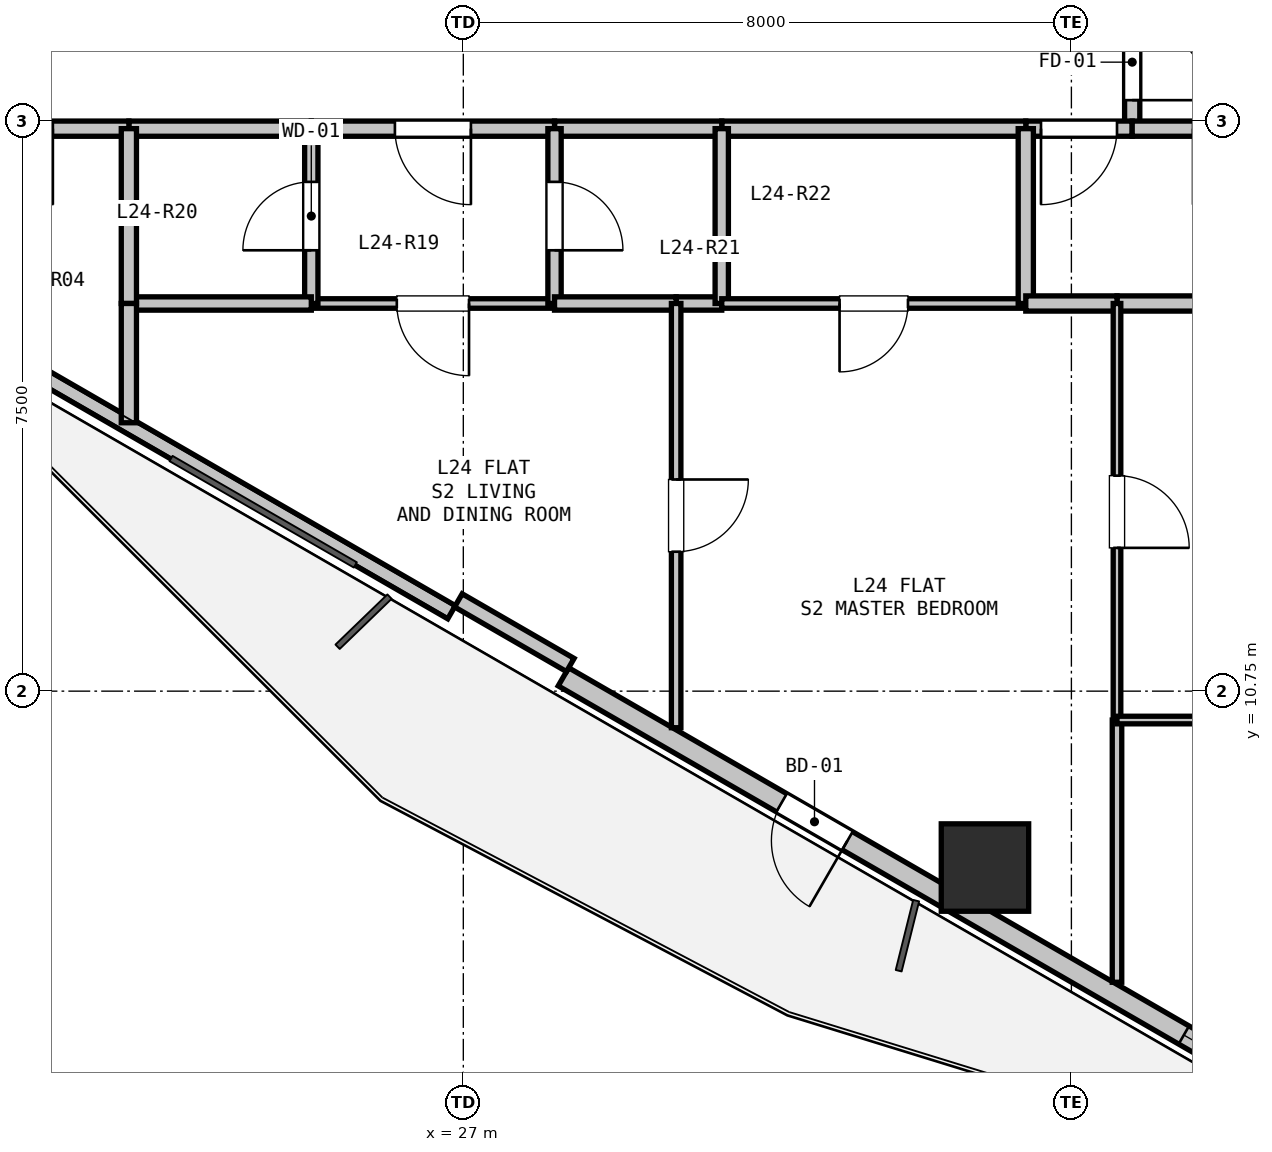
"""IFC4 building model, lengths in metres.
Left out: names, types, materials, properties, quantities, classifications, styles, units other than length and angle.
Written with IfcOpenShell. Run it as: python <this file> out.ifc"""

import sys

from ifc_helpers import new_model, si_unit, direction, frame, frame_2d, origin, origin_2d, place, context, subcontext, project, spatial, rectangle, hollow_rectangle, extrude, element, fill, save


model = new_model("IFC4")
c1 = context("Model", 3, precision=1e-05, world=origin(), true_north=direction((0.0, 1.0)))
c2 = subcontext(c1, "Body", "Model", "MODEL_VIEW")
j1 = project(units=[si_unit("LENGTHUNIT", "METRE"), si_unit("PLANEANGLEUNIT", "RADIAN")], contexts=[c1])
p1 = place(None, origin())
s1 = spatial("IfcSite", under=j1, at=p1, CompositionType="ELEMENT")
p2 = place(p1, origin())
s2 = spatial("IfcBuilding", under=s1, at=p2, CompositionType="ELEMENT")
p3 = place(p2, frame((0.0, 0.0, 90.0)))
s3 = spatial("IfcBuildingStorey", under=s2, at=p3, CompositionType="ELEMENT", Elevation=90.0)
p4 = place(p3, frame((33.863, 8.429, 0.0), z_axis=(0.0, 0.0, 1.0), x_axis=(1.0, 0.0, 0.0)))
e1 = element("IfcColumn", 1, at=p4, inside=s3, PredefinedType="COLUMN", context=c2, shape_type="SweptSolid", body=[
    extrude(hollow_rectangle(XDim=1.15, YDim=1.15, WallThickness=0.032, at=origin_2d()), origin(), (0.0, 0.0, 1.0), 3.3),
])
p5 = place(p3, frame((38.649, 4.973, 0.0), z_axis=(0.0, 0.0, 1.0), x_axis=(-0.866023023012, 0.500004123596, 0.0)))
e2 = element("IfcWall", 2, at=p5, inside=s3, PredefinedType="SOLIDWALL", context=c2, shape_type="SweptSolid", body=[
    extrude(rectangle(XDim=11.93, YDim=0.275, at=frame_2d((5.965, 0.0))), origin(), (0.0, 0.0, 1.0), 2.67),
])
p6 = place(p5, frame((7.616, 0.0, 0.0)))
e3 = element("IfcOpeningElement", 3, at=p6, cuts=e2, PredefinedType="OPENING", context=c2, shape_type="SweptSolid", body=[
    extrude(rectangle(XDim=1.0, YDim=2.1, at=frame_2d((0.5, 1.05))), frame((0.0, 0.147, 0.0), z_axis=(0.0, -1.0, 0.0), x_axis=(1.0, 0.0, 0.0)), (0.0, 0.0, 1.0), 0.295),
])
p7 = place(p5, frame((1.305, 0.0, 0.9)))
e4 = element("IfcOpeningElement", 4, at=p7, cuts=e2, PredefinedType="OPENING", context=c2, shape_type="SweptSolid", body=[
    extrude(rectangle(XDim=1.2, YDim=1.4, at=frame_2d((0.6, 0.7))), frame((0.0, 0.147, 0.0), z_axis=(0.0, -1.0, 0.0), x_axis=(1.0, 0.0, 0.0)), (0.0, 0.0, 1.0), 0.295),
])
p8 = place(p3, frame((26.845, 11.788, 0.0), z_axis=(0.0, 0.0, 1.0), x_axis=(-0.866027010039, 0.499997217876, 0.0)))
e5 = element("IfcWall", 5, at=p8, inside=s3, PredefinedType="PARAPET", context=c2, shape_type="SweptSolid", body=[
    extrude(rectangle(XDim=11.229, YDim=0.2, at=frame_2d((5.615, 0.0))), origin(), (0.0, 0.0, 1.0), 0.2),
])
p9 = place(p3, frame((28.407, 11.094, 0.0), z_axis=(0.0, 0.0, 1.0), x_axis=(-0.86605165483, 0.499954529098, 0.0)))
e6 = element("IfcWall", 6, at=p9, inside=s3, PredefinedType="PARAPET", context=c2, shape_type="SweptSolid", body=[
    extrude(rectangle(XDim=1.7, YDim=0.2, at=frame_2d((0.85, 0.0))), origin(), (0.0, 0.0, 1.0), 2.67),
])
p10 = place(p3, frame((35.8, 19.9, 0.0), z_axis=(0.0, 0.0, 1.0), x_axis=(0.0, -1.0, 0.0)))
e7 = element("IfcWall", 7, at=p10, inside=s3, PredefinedType="PARTITIONING", context=c2, shape_type="SweptSolid", body=[
    extrude(rectangle(XDim=1.75, YDim=0.2, at=frame_2d((0.875, 0.0))), origin(), (0.0, 0.0, 1.0), 3.05),
])
p11 = place(p10, frame((0.375, 0.0, 0.0)))
e8 = element("IfcOpeningElement", 8, at=p11, cuts=e7, PredefinedType="OPENING", context=c2, shape_type="SweptSolid", body=[
    extrude(rectangle(XDim=1.0, YDim=2.15, at=frame_2d((0.5, 1.075))), frame((0.0, 0.11, 0.0), z_axis=(0.0, -1.0, 0.0), x_axis=(1.0, 0.0, 0.0)), (0.0, 0.0, 1.0), 0.22),
])
p12 = place(p3, frame((35.8, 18.15, 0.0), z_axis=(0.0, 0.0, 1.0), x_axis=(-1.0, 0.0, 0.0)))
e9 = element("IfcWall", 9, at=p12, inside=s3, PredefinedType="PARTITIONING", context=c2, shape_type="SweptSolid", body=[
    extrude(rectangle(XDim=1.4, YDim=0.2, at=frame_2d((0.7, 0.0))), origin(), (0.0, 0.0, 1.0), 3.05),
])
p13 = place(p12, frame((0.2, 0.0, 0.0)))
e10 = element("IfcOpeningElement", 10, at=p13, cuts=e9, PredefinedType="OPENING", context=c2, shape_type="SweptSolid", body=[
    extrude(rectangle(XDim=1.0, YDim=2.15, at=frame_2d((0.5, 1.075))), frame((0.0, 0.11, 0.0), z_axis=(0.0, -1.0, 0.0), x_axis=(1.0, 0.0, 0.0)), (0.0, 0.0, 1.0), 0.22),
])
p14 = place(p3, frame((34.4, 18.15, 0.0), z_axis=(0.0, 0.0, 1.0), x_axis=(-1.0, 0.0, 0.0)))
e11 = element("IfcWall", 11, at=p14, inside=s3, PredefinedType="PARTITIONING", context=c2, shape_type="SweptSolid", body=[
    extrude(rectangle(XDim=4.0, YDim=0.2, at=frame_2d((2.0, 0.0))), origin(), (0.0, 0.0, 1.0), 3.05),
])
p15 = place(p3, frame((30.4, 18.15, 0.0), z_axis=(0.0, 0.0, 1.0), x_axis=(-1.0, 0.0, 0.0)))
e12 = element("IfcWall", 12, at=p15, inside=s3, PredefinedType="PARTITIONING", context=c2, shape_type="SweptSolid", body=[
    extrude(rectangle(XDim=2.2, YDim=0.2, at=frame_2d((1.1, 0.0))), origin(), (0.0, 0.0, 1.0), 3.05),
])
p16 = place(p3, frame((28.2, 18.15, 0.0), z_axis=(0.0, 0.0, 1.0), x_axis=(-1.0, 0.0, 0.0)))
e13 = element("IfcWall", 13, at=p16, inside=s3, PredefinedType="PARTITIONING", context=c2, shape_type="SweptSolid", body=[
    extrude(rectangle(XDim=3.2, YDim=0.2, at=frame_2d((1.6, 0.0))), origin(), (0.0, 0.0, 1.0), 3.05),
])
p17 = place(p16, frame((1.1, 0.0, 0.0)))
e14 = element("IfcOpeningElement", 14, at=p17, cuts=e13, PredefinedType="OPENING", context=c2, shape_type="SweptSolid", body=[
    extrude(rectangle(XDim=1.0, YDim=2.15, at=frame_2d((0.5, 1.075))), frame((0.0, 0.11, 0.0), z_axis=(0.0, -1.0, 0.0), x_axis=(1.0, 0.0, 0.0)), (0.0, 0.0, 1.0), 0.22),
])
p18 = place(p3, frame((25.0, 18.15, 0.0), z_axis=(0.0, 0.0, 1.0), x_axis=(-1.0, 0.0, 0.0)))
e15 = element("IfcWall", 15, at=p18, inside=s3, PredefinedType="PARTITIONING", context=c2, shape_type="SweptSolid", body=[
    extrude(rectangle(XDim=2.4, YDim=0.2, at=frame_2d((1.2, 0.0))), origin(), (0.0, 0.0, 1.0), 2.423),
])
p19 = place(p3, frame((22.6, 18.15, 0.0), z_axis=(0.0, 0.0, 1.0), x_axis=(-1.0, 0.0, 0.0)))
e16 = element("IfcWall", 16, at=p19, inside=s3, PredefinedType="PARTITIONING", context=c2, shape_type="SweptSolid", body=[
    extrude(rectangle(XDim=3.0, YDim=0.2, at=frame_2d((1.5, 0.0))), origin(), (0.0, 0.0, 1.0), 3.05),
])
p20 = place(p19, frame((1.0, 0.0, 0.0)))
e17 = element("IfcOpeningElement", 17, at=p20, cuts=e16, PredefinedType="OPENING", context=c2, shape_type="SweptSolid", body=[
    extrude(rectangle(XDim=1.0, YDim=2.15, at=frame_2d((0.5, 1.075))), frame((0.0, 0.11, 0.0), z_axis=(0.0, -1.0, 0.0), x_axis=(1.0, 0.0, 0.0)), (0.0, 0.0, 1.0), 0.22),
])
p21 = place(p3, frame((38.4, 18.15, 0.0), z_axis=(0.0, 0.0, 1.0), x_axis=(-1.0, 0.0, 0.0)))
e18 = element("IfcWall", 18, at=p21, inside=s3, PredefinedType="PARTITIONING", context=c2, shape_type="SweptSolid", body=[
    extrude(rectangle(XDim=2.6, YDim=0.2, at=frame_2d((1.3, 0.0))), origin(), (0.0, 0.0, 1.0), 2.423),
])
p22 = place(p21, frame((0.8, 0.0, 0.0)))
e19 = element("IfcOpeningElement", 19, at=p22, cuts=e18, PredefinedType="OPENING", context=c2, shape_type="SweptSolid", body=[
    extrude(rectangle(XDim=1.0, YDim=2.15, at=frame_2d((0.5, 1.075))), frame((0.0, 0.11, 0.0), z_axis=(0.0, -1.0, 0.0), x_axis=(1.0, 0.0, 0.0)), (0.0, 0.0, 1.0), 0.22),
])
p23 = place(p3, frame((28.2, 15.85, 0.0), z_axis=(0.0, 0.0, 1.0), x_axis=(-1.0, 0.0, 0.0)))
e20 = element("IfcWall", 20, at=p23, inside=s3, PredefinedType="PARTITIONING", context=c2, shape_type="SweptSolid", body=[
    extrude(rectangle(XDim=3.2, YDim=0.125, at=frame_2d((1.6, 0.0))), origin(), (0.0, 0.0, 1.0), 2.423),
])
p24 = place(p23, frame((1.125, 0.0, 0.0)))
e21 = element("IfcOpeningElement", 21, at=p24, cuts=e20, PredefinedType="OPENING", context=c2, shape_type="SweptSolid", body=[
    extrude(rectangle(XDim=0.95, YDim=2.1, at=frame_2d((0.475, 1.05))), frame((0.0, 0.073, 0.0), z_axis=(0.0, -1.0, 0.0), x_axis=(1.0, 0.0, 0.0)), (0.0, 0.0, 1.0), 0.145),
])
p25 = place(p3, frame((25.0, 15.85, 0.0), z_axis=(0.0, 0.0, 1.0), x_axis=(0.0, 1.0, 0.0)))
e22 = element("IfcWall", 22, at=p25, inside=s3, PredefinedType="PLUMBINGWALL", context=c2, shape_type="SweptSolid", body=[
    extrude(rectangle(XDim=2.3, YDim=0.175, at=frame_2d((1.15, 0.0))), origin(), (0.0, 0.0, 1.0), 2.423),
])
p26 = place(p25, frame((0.7, 0.0, 0.0)))
e23 = element("IfcOpeningElement", 23, at=p26, cuts=e22, PredefinedType="OPENING", context=c2, shape_type="SweptSolid", body=[
    extrude(rectangle(XDim=0.9, YDim=2.1, at=frame_2d((0.45, 1.05))), frame((0.0, 0.097, 0.0), z_axis=(0.0, -1.0, 0.0), x_axis=(1.0, 0.0, 0.0)), (0.0, 0.0, 1.0), 0.195),
])
p27 = place(p3, frame((28.2, 18.15, 0.0), z_axis=(0.0, 0.0, 1.0), x_axis=(0.0, -1.0, 0.0)))
e24 = element("IfcWall", 24, at=p27, inside=s3, PredefinedType="PLUMBINGWALL", context=c2, shape_type="SweptSolid", body=[
    extrude(rectangle(XDim=2.3, YDim=0.175, at=frame_2d((1.15, 0.0))), origin(), (0.0, 0.0, 1.0), 3.05),
])
p28 = place(p27, frame((0.7, 0.0, 0.0)))
e25 = element("IfcOpeningElement", 25, at=p28, cuts=e24, PredefinedType="OPENING", context=c2, shape_type="SweptSolid", body=[
    extrude(rectangle(XDim=0.9, YDim=2.1, at=frame_2d((0.45, 1.05))), frame((0.0, 0.097, 0.0), z_axis=(0.0, -1.0, 0.0), x_axis=(1.0, 0.0, 0.0)), (0.0, 0.0, 1.0), 0.195),
])
p29 = place(p3, frame((25.0, 15.85, 0.0), z_axis=(0.0, 0.0, 1.0), x_axis=(-1.0, 0.0, 0.0)))
e26 = element("IfcWall", 26, at=p29, inside=s3, PredefinedType="PLUMBINGWALL", context=c2, shape_type="SweptSolid", body=[
    extrude(rectangle(XDim=2.4, YDim=0.175, at=frame_2d((1.2, 0.0))), origin(), (0.0, 0.0, 1.0), 3.05),
])
p30 = place(p3, frame((22.6, 15.85, 0.0), z_axis=(0.0, 0.0, 1.0), x_axis=(0.0, 1.0, 0.0)))
e27 = element("IfcWall", 27, at=p30, inside=s3, PredefinedType="PARTITIONING", context=c2, shape_type="SweptSolid", body=[
    extrude(rectangle(XDim=2.3, YDim=0.2, at=frame_2d((1.15, 0.0))), origin(), (0.0, 0.0, 1.0), 3.05),
])
p31 = place(p3, frame((30.4, 15.85, 0.0), z_axis=(0.0, 0.0, 1.0), x_axis=(-1.0, 0.0, 0.0)))
e28 = element("IfcWall", 28, at=p31, inside=s3, PredefinedType="PLUMBINGWALL", context=c2, shape_type="SweptSolid", body=[
    extrude(rectangle(XDim=0.6, YDim=0.175, at=frame_2d((0.3, 0.0))), origin(), (0.0, 0.0, 1.0), 3.05),
])
p32 = place(p3, frame((29.8, 15.85, 0.0), z_axis=(0.0, 0.0, 1.0), x_axis=(-1.0, 0.0, 0.0)))
e29 = element("IfcWall", 29, at=p32, inside=s3, PredefinedType="PLUMBINGWALL", context=c2, shape_type="SweptSolid", body=[
    extrude(rectangle(XDim=1.6, YDim=0.175, at=frame_2d((0.8, 0.0))), origin(), (0.0, 0.0, 1.0), 3.05),
])
p33 = place(p3, frame((30.4, 18.15, 0.0), z_axis=(0.0, 0.0, 1.0), x_axis=(0.0, -1.0, 0.0)))
e30 = element("IfcWall", 30, at=p33, inside=s3, PredefinedType="PLUMBINGWALL", context=c2, shape_type="SweptSolid", body=[
    extrude(rectangle(XDim=2.3, YDim=0.175, at=frame_2d((1.15, 0.0))), origin(), (0.0, 0.0, 1.0), 3.05),
])
p34 = place(p3, frame((34.4, 15.85, 0.0), z_axis=(0.0, 0.0, 1.0), x_axis=(-1.0, 0.0, 0.0)))
e31 = element("IfcWall", 31, at=p34, inside=s3, PredefinedType="PARTITIONING", context=c2, shape_type="SweptSolid", body=[
    extrude(rectangle(XDim=4.0, YDim=0.125, at=frame_2d((2.0, 0.0))), origin(), (0.0, 0.0, 1.0), 3.05),
])
p35 = place(p34, frame((1.55, 0.0, 0.0)))
e32 = element("IfcOpeningElement", 32, at=p35, cuts=e31, PredefinedType="OPENING", context=c2, shape_type="SweptSolid", body=[
    extrude(rectangle(XDim=0.9, YDim=2.1, at=frame_2d((0.45, 1.05))), frame((0.0, 0.073, 0.0), z_axis=(0.0, -1.0, 0.0), x_axis=(1.0, 0.0, 0.0)), (0.0, 0.0, 1.0), 0.145),
])
p36 = place(p3, frame((34.4, 18.15, 0.0), z_axis=(0.0, 0.0, 1.0), x_axis=(0.0, -1.0, 0.0)))
e33 = element("IfcWall", 33, at=p36, inside=s3, PredefinedType="PARTITIONING", context=c2, shape_type="SweptSolid", body=[
    extrude(rectangle(XDim=2.3, YDim=0.2, at=frame_2d((1.15, 0.0))), origin(), (0.0, 0.0, 1.0), 3.05),
])
p37 = place(p3, frame((42.873, 15.85, 0.0), z_axis=(0.0, 0.0, 1.0), x_axis=(-1.0, 0.0, 0.0)))
e34 = element("IfcWall", 34, at=p37, inside=s3, PredefinedType="PARTITIONING", context=c2, shape_type="SweptSolid", body=[
    extrude(rectangle(XDim=7.273, YDim=0.2, at=frame_2d((3.636, 0.0))), origin(), (0.0, 0.0, 1.0), 2.365),
])
p38 = place(p3, frame((35.6, 15.85, 0.0), z_axis=(0.0, 0.0, 1.0), x_axis=(-1.0, 0.0, 0.0)))
e35 = element("IfcWall", 35, at=p38, inside=s3, PredefinedType="PARTITIONING", context=c2, shape_type="SweptSolid", body=[
    extrude(rectangle(XDim=1.2, YDim=0.2, at=frame_2d((0.6, 0.0))), origin(), (0.0, 0.0, 1.0), 3.05),
])
p39 = place(p3, frame((22.6, 15.85, 0.0), z_axis=(0.0, 0.0, 1.0), x_axis=(0.0, -1.0, 0.0)))
e36 = element("IfcWall", 36, at=p39, inside=s3, PredefinedType="PARTITIONING", context=c2, shape_type="SweptSolid", body=[
    extrude(rectangle(XDim=1.569, YDim=0.2, at=frame_2d((0.785, 0.0))), origin(), (0.0, 0.0, 1.0), 2.365),
])
p40 = place(p3, frame((29.8, 15.85, 0.0), z_axis=(0.0, 0.0, 1.0), x_axis=(0.0, -1.0, 0.0)))
e37 = element("IfcWall", 37, at=p40, inside=s3, PredefinedType="PARTITIONING", context=c2, shape_type="SweptSolid", body=[
    extrude(rectangle(XDim=5.581, YDim=0.125, at=frame_2d((2.791, 0.0))), origin(), (0.0, 0.0, 1.0), 2.365),
])
p41 = place(p40, frame((2.315, 0.0, 0.0)))
e38 = element("IfcOpeningElement", 38, at=p41, cuts=e37, PredefinedType="OPENING", context=c2, shape_type="SweptSolid", body=[
    extrude(rectangle(XDim=0.95, YDim=2.1, at=frame_2d((0.475, 1.05))), frame((0.0, 0.073, 0.0), z_axis=(0.0, -1.0, 0.0), x_axis=(1.0, 0.0, 0.0)), (0.0, 0.0, 1.0), 0.145),
])
p42 = place(p3, frame((35.6, 15.85, 0.0), z_axis=(0.0, 0.0, 1.0), x_axis=(0.0, -1.0, 0.0)))
e39 = element("IfcWall", 39, at=p42, inside=s3, PredefinedType="PARTITIONING", context=c2, shape_type="SweptSolid", body=[
    extrude(rectangle(XDim=5.48, YDim=0.1, at=frame_2d((2.74, 0.0))), origin(), (0.0, 0.0, 1.0), 3.05),
])
p43 = place(p42, frame((2.265, 0.0, 0.0)))
e40 = element("IfcOpeningElement", 40, at=p43, cuts=e39, PredefinedType="OPENING", context=c2, shape_type="SweptSolid", body=[
    extrude(rectangle(XDim=0.95, YDim=2.1, at=frame_2d((0.475, 1.05))), frame((0.0, 0.06, 0.0), z_axis=(0.0, -1.0, 0.0), x_axis=(1.0, 0.0, 0.0)), (0.0, 0.0, 1.0), 0.12),
])
p44 = place(p3, frame((35.6, 10.37, 0.0), z_axis=(0.0, 0.0, 1.0), x_axis=(0.0, -1.0, 0.0)))
e41 = element("IfcWall", 41, at=p44, inside=s3, PredefinedType="PARTITIONING", context=c2, shape_type="SweptSolid", body=[
    extrude(rectangle(XDim=3.45, YDim=0.125, at=frame_2d((1.725, 0.0))), origin(), (0.0, 0.0, 1.0), 2.66),
])
p45 = place(p3, frame((35.6, 10.37, 0.0), z_axis=(0.0, 0.0, 1.0), x_axis=(1.0, 0.0, 0.0)))
e42 = element("IfcWall", 42, at=p45, inside=s3, PredefinedType="PARTITIONING", context=c2, shape_type="SweptSolid", body=[
    extrude(rectangle(XDim=7.273, YDim=0.1, at=frame_2d((3.636, 0.0))), origin(), (0.0, 0.0, 1.0), 2.423),
])
p46 = place(p45, frame((3.162, 0.0, 0.0)))
e43 = element("IfcOpeningElement", 43, at=p46, cuts=e42, PredefinedType="OPENING", context=c2, shape_type="SweptSolid", body=[
    extrude(rectangle(XDim=0.95, YDim=2.1, at=frame_2d((0.475, 1.05))), frame((0.0, 0.06, 0.0), z_axis=(0.0, -1.0, 0.0), x_axis=(1.0, 0.0, 0.0)), (0.0, 0.0, 1.0), 0.12),
])
p47 = place(p6, origin())
e44 = element("IfcDoor", 44, at=p47, inside=s3, OperationType="SINGLE_SWING_LEFT", PredefinedType="DOOR", context=c2, shape_type="SweptSolid", body=[
    extrude(rectangle(XDim=1.0, YDim=2.1, at=frame_2d((0.5, 1.05))), frame((0.0, 0.025, 0.0), z_axis=(0.0, -1.0, 0.0), x_axis=(1.0, 0.0, 0.0)), (0.0, 0.0, 1.0), 0.05),
])
fill(e3, e44)
p48 = place(p7, origin())
e45 = element("IfcWindow", 45, at=p48, inside=s3, PartitioningType="SINGLE_PANEL", PredefinedType="WINDOW", context=c2, shape_type="SweptSolid", body=[
    extrude(rectangle(XDim=1.2, YDim=1.4, at=frame_2d((0.6, 0.7))), frame((0.0, 0.03, 0.0), z_axis=(0.0, -1.0, 0.0), x_axis=(1.0, 0.0, 0.0)), (0.0, 0.0, 1.0), 0.06),
])
fill(e4, e45)
p49 = place(p11, origin())
e46 = element("IfcDoor", 46, at=p49, inside=s3, OperationType="SINGLE_SWING_RIGHT", PredefinedType="DOOR", context=c2, shape_type="SweptSolid", body=[
    extrude(rectangle(XDim=1.0, YDim=2.15, at=frame_2d((0.5, 1.075))), frame((0.0, 0.025, 0.0), z_axis=(0.0, -1.0, 0.0), x_axis=(1.0, 0.0, 0.0)), (0.0, 0.0, 1.0), 0.05),
])
fill(e8, e46)
p50 = place(p17, origin())
e47 = element("IfcDoor", 47, at=p50, inside=s3, OperationType="SINGLE_SWING_LEFT", PredefinedType="DOOR", context=c2, shape_type="SweptSolid", body=[
    extrude(rectangle(XDim=1.0, YDim=2.15, at=frame_2d((0.5, 1.075))), frame((0.0, 0.025, 0.0), z_axis=(0.0, -1.0, 0.0), x_axis=(1.0, 0.0, 0.0)), (0.0, 0.0, 1.0), 0.05),
])
fill(e14, e47)
p51 = place(p13, origin())
e48 = element("IfcDoor", 48, at=p51, inside=s3, OperationType="SINGLE_SWING_RIGHT", PredefinedType="DOOR", context=c2, shape_type="SweptSolid", body=[
    extrude(rectangle(XDim=1.0, YDim=2.15, at=frame_2d((0.5, 1.075))), frame((0.0, 0.025, 0.0), z_axis=(0.0, -1.0, 0.0), x_axis=(1.0, 0.0, 0.0)), (0.0, 0.0, 1.0), 0.05),
])
fill(e10, e48)
p52 = place(p22, origin())
e49 = element("IfcDoor", 49, at=p52, inside=s3, OperationType="SINGLE_SWING_RIGHT", PredefinedType="DOOR", context=c2, shape_type="SweptSolid", body=[
    extrude(rectangle(XDim=1.0, YDim=2.15, at=frame_2d((0.5, 1.075))), frame((0.0, 0.025, 0.0), z_axis=(0.0, -1.0, 0.0), x_axis=(1.0, 0.0, 0.0)), (0.0, 0.0, 1.0), 0.05),
])
fill(e19, e49)
p53 = place(p26, origin())
e50 = element("IfcDoor", 50, at=p53, inside=s3, OperationType="SINGLE_SWING_LEFT", PredefinedType="DOOR", context=c2, shape_type="SweptSolid", body=[
    extrude(rectangle(XDim=0.9, YDim=2.1, at=frame_2d((0.45, 1.05))), frame((0.0, 0.025, 0.0), z_axis=(0.0, -1.0, 0.0), x_axis=(1.0, 0.0, 0.0)), (0.0, 0.0, 1.0), 0.05),
])
fill(e23, e50)
p54 = place(p28, origin())
e51 = element("IfcDoor", 51, at=p54, inside=s3, OperationType="SINGLE_SWING_RIGHT", PredefinedType="DOOR", context=c2, shape_type="SweptSolid", body=[
    extrude(rectangle(XDim=0.9, YDim=2.1, at=frame_2d((0.45, 1.05))), frame((0.0, 0.025, 0.0), z_axis=(0.0, -1.0, 0.0), x_axis=(1.0, 0.0, 0.0)), (0.0, 0.0, 1.0), 0.05),
])
fill(e25, e51)
p55 = place(p24, origin())
e52 = element("IfcDoor", 52, at=p55, inside=s3, OperationType="SINGLE_SWING_LEFT", PredefinedType="DOOR", context=c2, shape_type="SweptSolid", body=[
    extrude(rectangle(XDim=0.95, YDim=2.1, at=frame_2d((0.475, 1.05))), frame((0.0, 0.025, 0.0), z_axis=(0.0, -1.0, 0.0), x_axis=(1.0, 0.0, 0.0)), (0.0, 0.0, 1.0), 0.05),
])
fill(e21, e52)
p56 = place(p41, origin())
e53 = element("IfcDoor", 53, at=p56, inside=s3, OperationType="SINGLE_SWING_LEFT", PredefinedType="DOOR", context=c2, shape_type="SweptSolid", body=[
    extrude(rectangle(XDim=0.95, YDim=2.1, at=frame_2d((0.475, 1.05))), frame((0.0, 0.025, 0.0), z_axis=(0.0, -1.0, 0.0), x_axis=(1.0, 0.0, 0.0)), (0.0, 0.0, 1.0), 0.05),
])
fill(e38, e53)
p57 = place(p43, origin())
e54 = element("IfcDoor", 54, at=p57, inside=s3, OperationType="SINGLE_SWING_RIGHT", PredefinedType="DOOR", context=c2, shape_type="SweptSolid", body=[
    extrude(rectangle(XDim=0.95, YDim=2.1, at=frame_2d((0.475, 1.05))), frame((0.0, 0.025, 0.0), z_axis=(0.0, -1.0, 0.0), x_axis=(1.0, 0.0, 0.0)), (0.0, 0.0, 1.0), 0.05),
])
fill(e40, e54)
p58 = place(p35, origin())
e55 = element("IfcDoor", 55, at=p58, inside=s3, OperationType="SINGLE_SWING_RIGHT", PredefinedType="DOOR", context=c2, shape_type="SweptSolid", body=[
    extrude(rectangle(XDim=0.9, YDim=2.1, at=frame_2d((0.45, 1.05))), frame((0.0, 0.025, 0.0), z_axis=(0.0, -1.0, 0.0), x_axis=(1.0, 0.0, 0.0)), (0.0, 0.0, 1.0), 0.05),
])
fill(e32, e55)
save(model, sys.argv[1])
